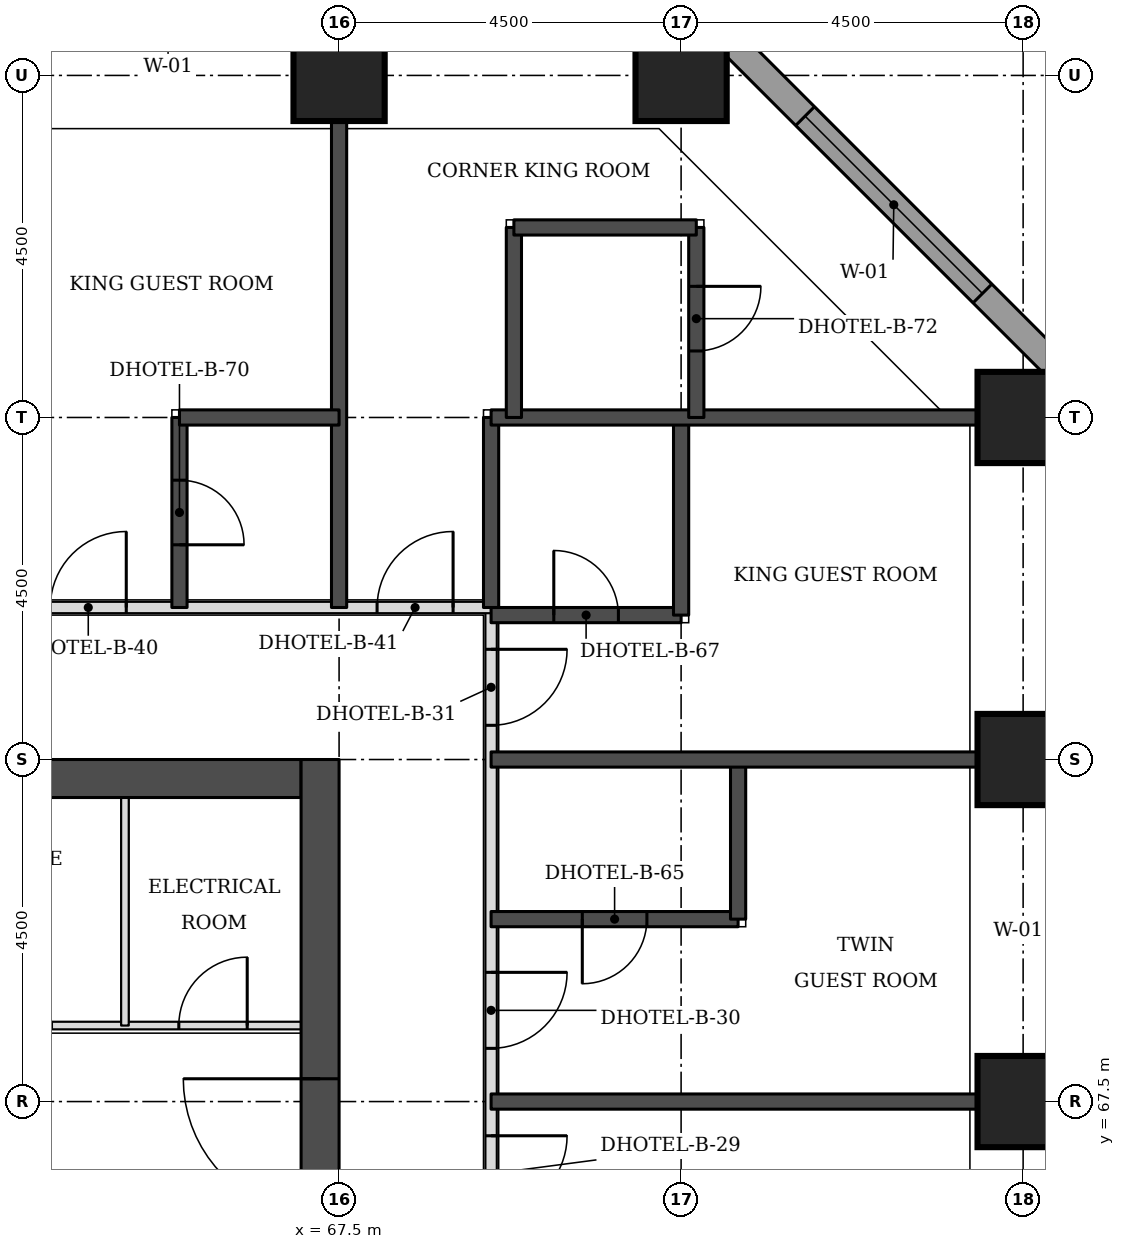
"""IFC4 building model, lengths in metres.
Left out: names, types, materials, properties, quantities, classifications, styles, units other than length and angle.
Written with IfcOpenShell. Run it as: python <this file> out.ifc"""

import sys

from ifc_helpers import new_model, si_unit, direction, frame, frame_2d, origin, origin_2d, place, context, subcontext, project, spatial, rectangle, extrude, element, fill, save


model = new_model("IFC4")
c1 = context("Model", 3, precision=1e-05, world=origin(), true_north=direction((0.0, 1.0)))
c2 = subcontext(c1, "Body", "Model", "MODEL_VIEW")
j1 = project(units=[si_unit("LENGTHUNIT", "METRE"), si_unit("PLANEANGLEUNIT", "RADIAN")], contexts=[c1])
p1 = place(None, origin())
s1 = spatial("IfcSite", under=j1, at=p1, CompositionType="ELEMENT")
p2 = place(p1, origin())
s2 = spatial("IfcBuilding", under=s1, at=p2, CompositionType="ELEMENT")
p3 = place(p2, frame((0.0, 0.0, 29.7)))
s3 = spatial("IfcBuildingStorey", under=s2, at=p3, CompositionType="ELEMENT", Elevation=29.7)
for number, where, z_axis, x_axis in (
    (1, (76.5, 67.5, 0.0), (0.0, 0.0, 1.0), (1.0, 0.0, 0.0)),
    (2, (76.5, 72.0, 0.0), (0.0, 0.0, 1.0), (1.0, 0.0, 0.0)),
    (3, (76.5, 76.5, 0.0), (0.0, 0.0, 1.0), (1.0, 0.0, 0.0)),
    (4, (67.5, 81.0, 0.0), (0.0, 0.0, 1.0), (1.0, 0.0, 0.0)),
    (5, (72.0, 81.0, 0.0), (0.0, 0.0, 1.0), (1.0, 0.0, 0.0)),
):
    element("IfcColumn", number, at=place(p3, frame(where, z_axis=z_axis, x_axis=x_axis)), inside=s3, PredefinedType="COLUMN", context=c2, shape_type="SweptSolid", body=[
        extrude(rectangle(XDim=1.2, YDim=1.2, at=origin_2d()), origin(), (0.0, 0.0, 1.0), 3.3),
    ])
p4 = place(p3, frame((45.5, 71.75, 0.0), z_axis=(0.0, 0.0, 1.0), x_axis=(1.0, 0.0, 0.0)))
e6 = element("IfcWall", 6, at=p4, inside=s3, PredefinedType="SHEAR", context=c2, shape_type="SweptSolid", body=[
    extrude(rectangle(XDim=21.5, YDim=0.5, at=frame_2d((10.75, 0.0))), origin(), (0.0, 0.0, 1.0), 3.3),
])
p5 = place(p3, frame((67.25, 49.5, 0.0), z_axis=(0.0, 0.0, 1.0), x_axis=(0.0, 1.0, 0.0)))
e7 = element("IfcWall", 7, at=p5, inside=s3, PredefinedType="SHEAR", context=c2, shape_type="SweptSolid", body=[
    extrude(rectangle(XDim=22.5, YDim=0.5, at=frame_2d((11.25, 0.0))), origin(), (0.0, 0.0, 1.0), 3.3),
])
p6 = place(p5, frame((4.2, 0.0, 0.0)))
e8 = element("IfcOpeningElement", 8, at=p6, cuts=e7, PredefinedType="OPENING", context=c2, shape_type="SweptSolid", body=[
    extrude(rectangle(XDim=1.8, YDim=2.1, at=frame_2d((0.9, 1.05))), frame((0.0, 0.26, 0.0), z_axis=(0.0, -1.0, 0.0), x_axis=(1.0, 0.0, 0.0)), (0.0, 0.0, 1.0), 0.52),
])
p7 = place(p5, frame((6.9, 0.0, 0.0)))
e9 = element("IfcOpeningElement", 9, at=p7, cuts=e7, PredefinedType="OPENING", context=c2, shape_type="SweptSolid", body=[
    extrude(rectangle(XDim=1.1, YDim=2.1, at=frame_2d((0.55, 1.05))), frame((0.0, 0.26, 0.0), z_axis=(0.0, -1.0, 0.0), x_axis=(1.0, 0.0, 0.0)), (0.0, 0.0, 1.0), 0.52),
])
p8 = place(p5, frame((13.6, 0.0, 0.0)))
e10 = element("IfcOpeningElement", 10, at=p8, cuts=e7, PredefinedType="OPENING", context=c2, shape_type="SweptSolid", body=[
    extrude(rectangle(XDim=1.1, YDim=2.1, at=frame_2d((0.55, 1.05))), frame((0.0, 0.26, 0.0), z_axis=(0.0, -1.0, 0.0), x_axis=(1.0, 0.0, 0.0)), (0.0, 0.0, 1.0), 0.52),
])
p9 = place(p5, frame((16.5, 0.0, 0.0)))
e11 = element("IfcOpeningElement", 11, at=p9, cuts=e7, PredefinedType="OPENING", context=c2, shape_type="SweptSolid", body=[
    extrude(rectangle(XDim=1.8, YDim=2.1, at=frame_2d((0.9, 1.05))), frame((0.0, 0.26, 0.0), z_axis=(0.0, -1.0, 0.0), x_axis=(1.0, 0.0, 0.0)), (0.0, 0.0, 1.0), 0.52),
])
p10 = place(p3, frame((77.326, 76.77, 0.0), z_axis=(0.0, 0.0, 1.0), x_axis=(-0.707106781187, 0.707106781187, 0.0)))
e12 = element("IfcWall", 12, at=p10, inside=s3, PredefinedType="STANDARD", context=c2, shape_type="SweptSolid", body=[
    extrude(rectangle(XDim=7.151, YDim=0.35, at=frame_2d((3.576, 0.0))), origin(), (0.0, 0.0, 1.0), 3.055),
])
p11 = place(p10, frame((1.926, 0.0, 0.8)))
e13 = element("IfcOpeningElement", 13, at=p11, cuts=e12, PredefinedType="OPENING", context=c2, shape_type="SweptSolid", body=[
    extrude(rectangle(XDim=3.3, YDim=1.5, at=frame_2d((1.65, 0.75))), frame((0.0, 0.185, 0.0), z_axis=(0.0, -1.0, 0.0), x_axis=(1.0, 0.0, 0.0)), (0.0, 0.0, 1.0), 0.37),
])
p12 = place(p3, frame((69.5, 47.5, 0.0), z_axis=(0.0, 0.0, 1.0), x_axis=(0.0, 1.0, 0.0)))
e14 = element("IfcWall", 14, at=p12, inside=s3, PredefinedType="PARTITIONING", context=c2, shape_type="SweptSolid", body=[
    extrude(rectangle(XDim=26.5, YDim=0.15, at=frame_2d((13.25, 0.0))), origin(), (0.0, 0.0, 1.0), 3.08),
])
p13 = place(p12, frame((24.95, 0.0, 0.0)))
e15 = element("IfcOpeningElement", 15, at=p13, cuts=e14, PredefinedType="OPENING", context=c2, shape_type="SweptSolid", body=[
    extrude(rectangle(XDim=1.0, YDim=2.1, at=frame_2d((0.5, 1.05))), frame((0.0, 0.085, 0.0), z_axis=(0.0, -1.0, 0.0), x_axis=(1.0, 0.0, 0.0)), (0.0, 0.0, 1.0), 0.17),
])
p14 = place(p12, frame((20.7, 0.0, 0.0)))
e16 = element("IfcOpeningElement", 16, at=p14, cuts=e14, PredefinedType="OPENING", context=c2, shape_type="SweptSolid", body=[
    extrude(rectangle(XDim=1.0, YDim=2.1, at=frame_2d((0.5, 1.05))), frame((0.0, 0.085, 0.0), z_axis=(0.0, -1.0, 0.0), x_axis=(1.0, 0.0, 0.0)), (0.0, 0.0, 1.0), 0.17),
])
p15 = place(p12, frame((18.55, 0.0, 0.0)))
e17 = element("IfcOpeningElement", 17, at=p15, cuts=e14, PredefinedType="OPENING", context=c2, shape_type="SweptSolid", body=[
    extrude(rectangle(XDim=1.0, YDim=2.1, at=frame_2d((0.5, 1.05))), frame((0.0, 0.085, 0.0), z_axis=(0.0, -1.0, 0.0), x_axis=(1.0, 0.0, 0.0)), (0.0, 0.0, 1.0), 0.17),
])
p16 = place(p12, frame((11.7, 0.0, 0.0)))
e18 = element("IfcOpeningElement", 18, at=p16, cuts=e14, PredefinedType="OPENING", context=c2, shape_type="SweptSolid", body=[
    extrude(rectangle(XDim=1.0, YDim=2.1, at=frame_2d((0.5, 1.05))), frame((0.0, 0.085, 0.0), z_axis=(0.0, -1.0, 0.0), x_axis=(1.0, 0.0, 0.0)), (0.0, 0.0, 1.0), 0.17),
])
p17 = place(p12, frame((7.65, 0.0, 0.0)))
e19 = element("IfcOpeningElement", 19, at=p17, cuts=e14, PredefinedType="OPENING", context=c2, shape_type="SweptSolid", body=[
    extrude(rectangle(XDim=1.1, YDim=2.1, at=frame_2d((0.55, 1.05))), frame((0.0, 0.085, 0.0), z_axis=(0.0, -1.0, 0.0), x_axis=(1.0, 0.0, 0.0)), (0.0, 0.0, 1.0), 0.17),
])
p18 = place(p12, frame((0.447, 0.0, 0.0)))
e20 = element("IfcOpeningElement", 20, at=p18, cuts=e14, PredefinedType="OPENING", context=c2, shape_type="SweptSolid", body=[
    extrude(rectangle(XDim=1.0, YDim=2.1, at=frame_2d((0.5, 1.05))), frame((0.0, 0.085, 0.0), z_axis=(0.0, -1.0, 0.0), x_axis=(1.0, 0.0, 0.0)), (0.0, 0.0, 1.0), 0.17),
])
p19 = place(p3, frame((43.0, 74.0, 0.0), z_axis=(0.0, 0.0, 1.0), x_axis=(1.0, 0.0, 0.0)))
e21 = element("IfcWall", 21, at=p19, inside=s3, PredefinedType="PARTITIONING", context=c2, shape_type="SweptSolid", body=[
    extrude(rectangle(XDim=26.5, YDim=0.15, at=frame_2d((13.25, 0.0))), origin(), (0.0, 0.0, 1.0), 3.08),
])
p20 = place(p19, frame((4.65, 0.0, 0.0)))
e22 = element("IfcOpeningElement", 22, at=p20, cuts=e21, PredefinedType="OPENING", context=c2, shape_type="SweptSolid", body=[
    extrude(rectangle(XDim=1.0, YDim=2.1, at=frame_2d((0.5, 1.05))), frame((0.0, 0.085, 0.0), z_axis=(0.0, -1.0, 0.0), x_axis=(1.0, 0.0, 0.0)), (0.0, 0.0, 1.0), 0.17),
])
p21 = place(p19, frame((16.6, 0.0, 0.0)))
e23 = element("IfcOpeningElement", 23, at=p21, cuts=e21, PredefinedType="OPENING", context=c2, shape_type="SweptSolid", body=[
    extrude(rectangle(XDim=1.0, YDim=2.1, at=frame_2d((0.5, 1.05))), frame((0.0, 0.085, 0.0), z_axis=(0.0, -1.0, 0.0), x_axis=(1.0, 0.0, 0.0)), (0.0, 0.0, 1.0), 0.17),
])
p22 = place(p19, frame((20.7, 0.0, 0.0)))
e24 = element("IfcOpeningElement", 24, at=p22, cuts=e21, PredefinedType="OPENING", context=c2, shape_type="SweptSolid", body=[
    extrude(rectangle(XDim=1.0, YDim=2.1, at=frame_2d((0.5, 1.05))), frame((0.0, 0.085, 0.0), z_axis=(0.0, -1.0, 0.0), x_axis=(1.0, 0.0, 0.0)), (0.0, 0.0, 1.0), 0.17),
])
p23 = place(p19, frame((0.5, 0.0, 0.0)))
e25 = element("IfcOpeningElement", 25, at=p23, cuts=e21, PredefinedType="OPENING", context=c2, shape_type="SweptSolid", body=[
    extrude(rectangle(XDim=1.0, YDim=2.1, at=frame_2d((0.5, 1.05))), frame((0.0, 0.085, 0.0), z_axis=(0.0, -1.0, 0.0), x_axis=(1.0, 0.0, 0.0)), (0.0, 0.0, 1.0), 0.17),
])
p24 = place(p19, frame((25.0, 0.0, 0.0)))
e26 = element("IfcOpeningElement", 26, at=p24, cuts=e21, PredefinedType="OPENING", context=c2, shape_type="SweptSolid", body=[
    extrude(rectangle(XDim=1.0, YDim=2.1, at=frame_2d((0.5, 1.05))), frame((0.0, 0.085, 0.0), z_axis=(0.0, -1.0, 0.0), x_axis=(1.0, 0.0, 0.0)), (0.0, 0.0, 1.0), 0.17),
])
p25 = place(p3, frame((69.5, 67.5, 0.0), z_axis=(0.0, 0.0, 1.0), x_axis=(1.0, 0.0, 0.0)))
e27 = element("IfcWall", 27, at=p25, inside=s3, PredefinedType="SOLIDWALL", context=c2, shape_type="SweptSolid", body=[
    extrude(rectangle(XDim=6.4, YDim=0.2, at=frame_2d((3.2, 0.0))), origin(), (0.0, 0.0, 1.0), 3.08),
])
p26 = place(p3, frame((69.5, 69.9, 0.0), z_axis=(0.0, 0.0, 1.0), x_axis=(1.0, 0.0, 0.0)))
e28 = element("IfcWall", 28, at=p26, inside=s3, PredefinedType="SOLIDWALL", context=c2, shape_type="SweptSolid", body=[
    extrude(rectangle(XDim=3.25, YDim=0.2, at=frame_2d((1.625, 0.0))), origin(), (0.0, 0.0, 1.0), 3.08),
])
p27 = place(p26, frame((1.2, 0.0, 0.0)))
e29 = element("IfcOpeningElement", 29, at=p27, cuts=e28, PredefinedType="OPENING", context=c2, shape_type="SweptSolid", body=[
    extrude(rectangle(XDim=0.85, YDim=2.1, at=frame_2d((0.425, 1.05))), frame((0.0, 0.11, 0.0), z_axis=(0.0, -1.0, 0.0), x_axis=(1.0, 0.0, 0.0)), (0.0, 0.0, 1.0), 0.22),
])
p28 = place(p3, frame((72.75, 69.9, 0.0), z_axis=(0.0, 0.0, 1.0), x_axis=(0.0, 1.0, 0.0)))
e30 = element("IfcWall", 30, at=p28, inside=s3, PredefinedType="SOLIDWALL", context=c2, shape_type="SweptSolid", body=[
    extrude(rectangle(XDim=2.1, YDim=0.2, at=frame_2d((1.05, 0.0))), origin(), (0.0, 0.0, 1.0), 3.08),
])
p29 = place(p3, frame((69.5, 72.0, 0.0), z_axis=(0.0, 0.0, 1.0), x_axis=(1.0, 0.0, 0.0)))
e31 = element("IfcWall", 31, at=p29, inside=s3, PredefinedType="SOLIDWALL", context=c2, shape_type="SweptSolid", body=[
    extrude(rectangle(XDim=6.4, YDim=0.2, at=frame_2d((3.2, 0.0))), origin(), (0.0, 0.0, 1.0), 3.08),
])
p30 = place(p3, frame((69.5, 73.9, 0.0), z_axis=(0.0, 0.0, 1.0), x_axis=(1.0, 0.0, 0.0)))
e32 = element("IfcWall", 32, at=p30, inside=s3, PredefinedType="SOLIDWALL", context=c2, shape_type="SweptSolid", body=[
    extrude(rectangle(XDim=2.5, YDim=0.2, at=frame_2d((1.25, 0.0))), origin(), (0.0, 0.0, 1.0), 3.08),
])
p31 = place(p30, frame((0.825, 0.0, 0.0)))
e33 = element("IfcOpeningElement", 33, at=p31, cuts=e32, PredefinedType="OPENING", context=c2, shape_type="SweptSolid", body=[
    extrude(rectangle(XDim=0.85, YDim=2.1, at=frame_2d((0.425, 1.05))), frame((0.0, 0.11, 0.0), z_axis=(0.0, -1.0, 0.0), x_axis=(1.0, 0.0, 0.0)), (0.0, 0.0, 1.0), 0.22),
])
p32 = place(p3, frame((72.0, 73.9, 0.0), z_axis=(0.0, 0.0, 1.0), x_axis=(0.0, 1.0, 0.0)))
e34 = element("IfcWall", 34, at=p32, inside=s3, PredefinedType="SOLIDWALL", context=c2, shape_type="SweptSolid", body=[
    extrude(rectangle(XDim=2.6, YDim=0.2, at=frame_2d((1.3, 0.0))), origin(), (0.0, 0.0, 1.0), 3.08),
])
p33 = place(p3, frame((65.4, 74.0, 0.0), z_axis=(0.0, 0.0, 1.0), x_axis=(0.0, 1.0, 0.0)))
e35 = element("IfcWall", 35, at=p33, inside=s3, PredefinedType="SOLIDWALL", context=c2, shape_type="SweptSolid", body=[
    extrude(rectangle(XDim=2.5, YDim=0.2, at=frame_2d((1.25, 0.0))), origin(), (0.0, 0.0, 1.0), 3.08),
])
p34 = place(p33, frame((0.825, 0.0, 0.0)))
e36 = element("IfcOpeningElement", 36, at=p34, cuts=e35, PredefinedType="OPENING", context=c2, shape_type="SweptSolid", body=[
    extrude(rectangle(XDim=0.85, YDim=2.1, at=frame_2d((0.425, 1.05))), frame((0.0, 0.11, 0.0), z_axis=(0.0, -1.0, 0.0), x_axis=(1.0, 0.0, 0.0)), (0.0, 0.0, 1.0), 0.22),
])
p35 = place(p3, frame((67.5, 74.0, 0.0), z_axis=(0.0, 0.0, 1.0), x_axis=(0.0, 1.0, 0.0)))
e37 = element("IfcWall", 37, at=p35, inside=s3, PredefinedType="SOLIDWALL", context=c2, shape_type="SweptSolid", body=[
    extrude(rectangle(XDim=6.4, YDim=0.2, at=frame_2d((3.2, 0.0))), origin(), (0.0, 0.0, 1.0), 3.08),
])
p36 = place(p3, frame((69.5, 74.0, 0.0), z_axis=(0.0, 0.0, 1.0), x_axis=(0.0, 1.0, 0.0)))
e38 = element("IfcWall", 38, at=p36, inside=s3, PredefinedType="SOLIDWALL", context=c2, shape_type="SweptSolid", body=[
    extrude(rectangle(XDim=2.5, YDim=0.2, at=frame_2d((1.25, 0.0))), origin(), (0.0, 0.0, 1.0), 3.08),
])
p37 = place(p3, frame((65.4, 76.5, 0.0), z_axis=(0.0, 0.0, 1.0), x_axis=(1.0, 0.0, 0.0)))
e39 = element("IfcWall", 39, at=p37, inside=s3, PredefinedType="SOLIDWALL", context=c2, shape_type="SweptSolid", body=[
    extrude(rectangle(XDim=2.1, YDim=0.2, at=frame_2d((1.05, 0.0))), origin(), (0.0, 0.0, 1.0), 3.08),
])
p38 = place(p3, frame((69.5, 76.5, 0.0), z_axis=(0.0, 0.0, 1.0), x_axis=(1.0, 0.0, 0.0)))
e40 = element("IfcWall", 40, at=p38, inside=s3, PredefinedType="SOLIDWALL", context=c2, shape_type="SweptSolid", body=[
    extrude(rectangle(XDim=6.4, YDim=0.2, at=frame_2d((3.2, 0.0))), origin(), (0.0, 0.0, 1.0), 3.08),
])
p39 = place(p3, frame((69.8, 76.5, 0.0), z_axis=(0.0, 0.0, 1.0), x_axis=(0.0, 1.0, 0.0)))
e41 = element("IfcWall", 41, at=p39, inside=s3, PredefinedType="SOLIDWALL", context=c2, shape_type="SweptSolid", body=[
    extrude(rectangle(XDim=2.5, YDim=0.2, at=frame_2d((1.25, 0.0))), origin(), (0.0, 0.0, 1.0), 3.08),
])
p40 = place(p3, frame((72.2, 76.5, 0.0), z_axis=(0.0, 0.0, 1.0), x_axis=(0.0, 1.0, 0.0)))
e42 = element("IfcWall", 42, at=p40, inside=s3, PredefinedType="SOLIDWALL", context=c2, shape_type="SweptSolid", body=[
    extrude(rectangle(XDim=2.5, YDim=0.2, at=frame_2d((1.25, 0.0))), origin(), (0.0, 0.0, 1.0), 3.08),
])
p41 = place(p40, frame((0.875, 0.0, 0.0)))
e43 = element("IfcOpeningElement", 43, at=p41, cuts=e42, PredefinedType="OPENING", context=c2, shape_type="SweptSolid", body=[
    extrude(rectangle(XDim=0.85, YDim=2.1, at=frame_2d((0.425, 1.05))), frame((0.0, 0.11, 0.0), z_axis=(0.0, -1.0, 0.0), x_axis=(1.0, 0.0, 0.0)), (0.0, 0.0, 1.0), 0.22),
])
p42 = place(p3, frame((69.8, 79.0, 0.0), z_axis=(0.0, 0.0, 1.0), x_axis=(1.0, 0.0, 0.0)))
e44 = element("IfcWall", 44, at=p42, inside=s3, PredefinedType="SOLIDWALL", context=c2, shape_type="SweptSolid", body=[
    extrude(rectangle(XDim=2.4, YDim=0.2, at=frame_2d((1.2, 0.0))), origin(), (0.0, 0.0, 1.0), 3.08),
])
p43 = place(p3, frame((61.85, 68.5, 0.0), z_axis=(0.0, 0.0, 1.0), x_axis=(1.0, 0.0, 0.0)))
e45 = element("IfcWall", 45, at=p43, inside=s3, PredefinedType="PARTITIONING", context=c2, shape_type="SweptSolid", body=[
    extrude(rectangle(XDim=5.15, YDim=0.1, at=frame_2d((2.575, 0.0))), origin(), (0.0, 0.0, 1.0), 3.08),
])
p44 = place(p43, frame((3.541, 0.0, 0.0)))
e46 = element("IfcOpeningElement", 46, at=p44, cuts=e45, PredefinedType="OPENING", context=c2, shape_type="SweptSolid", body=[
    extrude(rectangle(XDim=0.9, YDim=2.1, at=frame_2d((0.45, 1.05))), frame((0.0, 0.06, 0.0), z_axis=(0.0, -1.0, 0.0), x_axis=(1.0, 0.0, 0.0)), (0.0, 0.0, 1.0), 0.12),
])
p45 = place(p43, frame((0.966, 0.0, 0.0)))
e47 = element("IfcOpeningElement", 47, at=p45, cuts=e45, PredefinedType="OPENING", context=c2, shape_type="SweptSolid", body=[
    extrude(rectangle(XDim=0.9, YDim=2.1, at=frame_2d((0.45, 1.05))), frame((0.0, 0.06, 0.0), z_axis=(0.0, -1.0, 0.0), x_axis=(1.0, 0.0, 0.0)), (0.0, 0.0, 1.0), 0.12),
])
p46 = place(p3, frame((64.683, 68.5, 0.0), z_axis=(0.0, 0.0, 1.0), x_axis=(0.0, 1.0, 0.0)))
e48 = element("IfcWall", 48, at=p46, inside=s3, PredefinedType="PARTITIONING", context=c2, shape_type="SweptSolid", body=[
    extrude(rectangle(XDim=3.0, YDim=0.1, at=frame_2d((1.5, 0.0))), origin(), (0.0, 0.0, 1.0), 3.08),
])
p47 = place(p11, origin())
e49 = element("IfcWindow", 49, at=p47, inside=s3, PartitioningType="SINGLE_PANEL", PredefinedType="WINDOW", context=c2, shape_type="SweptSolid", body=[
    extrude(rectangle(XDim=3.3, YDim=1.5, at=frame_2d((1.65, 0.75))), frame((0.0, 0.085, 0.0), z_axis=(0.0, -1.0, 0.0), x_axis=(1.0, 0.0, 0.0)), (0.0, 0.0, 1.0), 0.06),
])
fill(e13, e49)
p48 = place(p22, origin())
e50 = element("IfcDoor", 50, at=p48, inside=s3, OperationType="SINGLE_SWING_RIGHT", PredefinedType="DOOR", context=c2, shape_type="SweptSolid", body=[
    extrude(rectangle(XDim=1.0, YDim=2.1, at=frame_2d((0.5, 1.05))), frame((0.0, 0.025, 0.0), z_axis=(0.0, -1.0, 0.0), x_axis=(1.0, 0.0, 0.0)), (0.0, 0.0, 1.0), 0.05),
])
fill(e24, e50)
p49 = place(p34, frame((0.85, 0.0, 0.0), z_axis=(0.0, 0.0, 1.0), x_axis=(-1.0, 0.0, 0.0)))
e51 = element("IfcDoor", 51, at=p49, inside=s3, OperationType="SINGLE_SWING_RIGHT", PredefinedType="DOOR", context=c2, shape_type="SweptSolid", body=[
    extrude(rectangle(XDim=0.85, YDim=2.1, at=frame_2d((0.425, 1.05))), frame((0.0, 0.025, 0.0), z_axis=(0.0, -1.0, 0.0), x_axis=(1.0, 0.0, 0.0)), (0.0, 0.0, 1.0), 0.05),
])
fill(e36, e51)
p50 = place(p13, frame((1.0, 0.0, 0.0), z_axis=(0.0, 0.0, 1.0), x_axis=(-1.0, 0.0, 0.0)))
e52 = element("IfcDoor", 52, at=p50, inside=s3, OperationType="SINGLE_SWING_LEFT", PredefinedType="DOOR", context=c2, shape_type="SweptSolid", body=[
    extrude(rectangle(XDim=1.0, YDim=2.1, at=frame_2d((0.5, 1.05))), frame((0.0, 0.025, 0.0), z_axis=(0.0, -1.0, 0.0), x_axis=(1.0, 0.0, 0.0)), (0.0, 0.0, 1.0), 0.05),
])
fill(e15, e52)
p51 = place(p31, origin())
e53 = element("IfcDoor", 53, at=p51, inside=s3, OperationType="SINGLE_SWING_LEFT", PredefinedType="DOOR", context=c2, shape_type="SweptSolid", body=[
    extrude(rectangle(XDim=0.85, YDim=2.1, at=frame_2d((0.425, 1.05))), frame((0.0, 0.025, 0.0), z_axis=(0.0, -1.0, 0.0), x_axis=(1.0, 0.0, 0.0)), (0.0, 0.0, 1.0), 0.05),
])
fill(e33, e53)
p52 = place(p14, frame((1.0, 0.0, 0.0), z_axis=(0.0, 0.0, 1.0), x_axis=(-1.0, 0.0, 0.0)))
e54 = element("IfcDoor", 54, at=p52, inside=s3, OperationType="SINGLE_SWING_LEFT", PredefinedType="DOOR", context=c2, shape_type="SweptSolid", body=[
    extrude(rectangle(XDim=1.0, YDim=2.1, at=frame_2d((0.5, 1.05))), frame((0.0, 0.025, 0.0), z_axis=(0.0, -1.0, 0.0), x_axis=(1.0, 0.0, 0.0)), (0.0, 0.0, 1.0), 0.05),
])
fill(e16, e54)
p53 = place(p27, frame((0.85, 0.0, 0.0), z_axis=(0.0, 0.0, 1.0), x_axis=(-1.0, 0.0, 0.0)))
e55 = element("IfcDoor", 55, at=p53, inside=s3, OperationType="SINGLE_SWING_RIGHT", PredefinedType="DOOR", context=c2, shape_type="SweptSolid", body=[
    extrude(rectangle(XDim=0.85, YDim=2.1, at=frame_2d((0.425, 1.05))), frame((0.0, 0.025, 0.0), z_axis=(0.0, -1.0, 0.0), x_axis=(1.0, 0.0, 0.0)), (0.0, 0.0, 1.0), 0.05),
])
fill(e29, e55)
p54 = place(p15, frame((1.0, 0.0, 0.0), z_axis=(0.0, 0.0, 1.0), x_axis=(-1.0, 0.0, 0.0)))
e56 = element("IfcDoor", 56, at=p54, inside=s3, OperationType="SINGLE_SWING_LEFT", PredefinedType="DOOR", context=c2, shape_type="SweptSolid", body=[
    extrude(rectangle(XDim=1.0, YDim=2.1, at=frame_2d((0.5, 1.05))), frame((0.0, 0.025, 0.0), z_axis=(0.0, -1.0, 0.0), x_axis=(1.0, 0.0, 0.0)), (0.0, 0.0, 1.0), 0.05),
])
fill(e17, e56)
p55 = place(p24, origin())
e57 = element("IfcDoor", 57, at=p55, inside=s3, OperationType="SINGLE_SWING_RIGHT", PredefinedType="DOOR", context=c2, shape_type="SweptSolid", body=[
    extrude(rectangle(XDim=1.0, YDim=2.1, at=frame_2d((0.5, 1.05))), frame((0.0, 0.025, 0.0), z_axis=(0.0, -1.0, 0.0), x_axis=(1.0, 0.0, 0.0)), (0.0, 0.0, 1.0), 0.05),
])
fill(e26, e57)
p56 = place(p41, frame((0.85, 0.0, 0.0), z_axis=(0.0, 0.0, 1.0), x_axis=(-1.0, 0.0, 0.0)))
e58 = element("IfcDoor", 58, at=p56, inside=s3, OperationType="SINGLE_SWING_LEFT", PredefinedType="DOOR", context=c2, shape_type="SweptSolid", body=[
    extrude(rectangle(XDim=0.85, YDim=2.1, at=frame_2d((0.425, 1.05))), frame((0.0, 0.025, 0.0), z_axis=(0.0, -1.0, 0.0), x_axis=(1.0, 0.0, 0.0)), (0.0, 0.0, 1.0), 0.05),
])
fill(e43, e58)
p57 = place(p9, origin())
e59 = element("IfcDoor", 59, at=p57, inside=s3, OperationType="SINGLE_SWING_RIGHT", PredefinedType="DOOR", context=c2, shape_type="SweptSolid", body=[
    extrude(rectangle(XDim=1.8, YDim=2.1, at=frame_2d((0.9, 1.05))), frame((0.0, 0.025, 0.0), z_axis=(0.0, -1.0, 0.0), x_axis=(1.0, 0.0, 0.0)), (0.0, 0.0, 1.0), 0.05),
])
fill(e11, e59)
p58 = place(p44, origin())
e60 = element("IfcDoor", 60, at=p58, inside=s3, OperationType="SINGLE_SWING_RIGHT", PredefinedType="DOOR", context=c2, shape_type="SweptSolid", body=[
    extrude(rectangle(XDim=0.9, YDim=2.1, at=frame_2d((0.45, 1.05))), frame((0.0, 0.025, 0.0), z_axis=(0.0, -1.0, 0.0), x_axis=(1.0, 0.0, 0.0)), (0.0, 0.0, 1.0), 0.05),
])
fill(e46, e60)
save(model, sys.argv[1])
